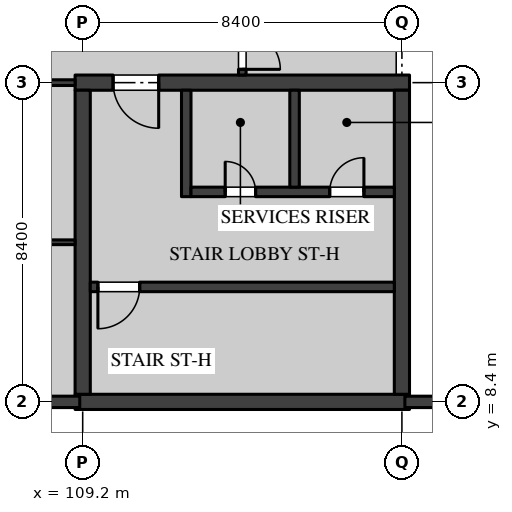
"""IFC4 building model, lengths in metres.
Left out: names, types, materials, properties, quantities, classifications, styles, units other than length and angle.
Written with IfcOpenShell. Run it as: python <this file> out.ifc"""

import sys

from ifc_helpers import new_model, si_unit, direction, frame, frame_2d, origin, place, context, subcontext, project, spatial, polyline, rectangle, outline, extrude, element, fill, save


model = new_model("IFC4")
c1 = context("Model", 3, precision=1e-05, world=origin(), true_north=direction((0.0, 1.0)))
c2 = subcontext(c1, "Body", "Model", "MODEL_VIEW")
j1 = project(units=[si_unit("LENGTHUNIT", "METRE"), si_unit("PLANEANGLEUNIT", "RADIAN")], contexts=[c1])
p1 = place(None, origin())
s1 = spatial("IfcSite", under=j1, at=p1, CompositionType="ELEMENT")
p2 = place(p1, origin())
s2 = spatial("IfcBuilding", under=s1, at=p2, CompositionType="ELEMENT")
p3 = place(p2, frame((0.0, 0.0, 5.4)))
s3 = spatial("IfcBuildingStorey", under=s2, at=p3, CompositionType="ELEMENT", Elevation=5.4)
p4 = place(p3, frame((109.0, 8.4, 0.0), z_axis=(0.0, 0.0, 1.0), x_axis=(1.0, 0.0, 0.0)))
e1 = element("IfcWall", 1, at=p4, inside=s3, PredefinedType="SHEAR", context=c2, shape_type="SweptSolid", body=[
    extrude(rectangle(XDim=8.8, YDim=0.4, at=frame_2d((4.4, 0.0))), origin(), (0.0, 0.0, 1.0), 3.0),
])
p5 = place(p3, frame((109.0, 16.8, 0.0), z_axis=(0.0, 0.0, 1.0), x_axis=(1.0, 0.0, 0.0)))
e2 = element("IfcWall", 2, at=p5, inside=s3, PredefinedType="SHEAR", context=c2, shape_type="SweptSolid", body=[
    extrude(rectangle(XDim=8.8, YDim=0.4, at=frame_2d((4.4, 0.0))), origin(), (0.0, 0.0, 1.0), 3.0),
])
p6 = place(p5, frame((1.0, 0.0, 0.0)))
e3 = element("IfcOpeningElement", 3, at=p6, cuts=e2, PredefinedType="OPENING", context=c2, shape_type="SweptSolid", body=[
    extrude(rectangle(XDim=1.2, YDim=2.1, at=frame_2d((0.6, 1.05))), frame((0.0, 0.21, 0.0), z_axis=(0.0, -1.0, 0.0), x_axis=(1.0, 0.0, 0.0)), (0.0, 0.0, 1.0), 0.42),
])
for number, where, z_axis, x_axis in (
    (4, (109.2, 8.6, 0.0), (0.0, 0.0, 1.0), (0.0, 1.0, 0.0)),
    (5, (117.6, 8.6, 0.0), (0.0, 0.0, 1.0), (0.0, 1.0, 0.0)),
):
    element("IfcWall", number, at=place(p3, frame(where, z_axis=z_axis, x_axis=x_axis)), inside=s3, PredefinedType="SHEAR", context=c2, shape_type="SweptSolid", body=[
        extrude(rectangle(XDim=8.0, YDim=0.4, at=frame_2d((4.0, 0.0))), origin(), (0.0, 0.0, 1.0), 3.0),
    ])
p7 = place(p3, frame((109.4, 11.425, 0.0), z_axis=(0.0, 0.0, 1.0), x_axis=(1.0, 0.0, 0.0)))
e6 = element("IfcWall", 6, at=p7, inside=s3, PredefinedType="SOLIDWALL", context=c2, shape_type="SweptSolid", body=[
    extrude(rectangle(XDim=8.0, YDim=0.25, at=frame_2d((4.0, 0.0))), origin(), (0.0, 0.0, 1.0), 3.0),
])
p8 = place(p7, frame((0.2, 0.0, 0.0)))
e7 = element("IfcOpeningElement", 7, at=p8, cuts=e6, PredefinedType="OPENING", context=c2, shape_type="SweptSolid", body=[
    extrude(rectangle(XDim=1.1, YDim=2.1, at=frame_2d((0.55, 1.05))), frame((0.0, 0.135, 0.0), z_axis=(0.0, -1.0, 0.0), x_axis=(1.0, 0.0, 0.0)), (0.0, 0.0, 1.0), 0.27),
])
p9 = place(p3, frame((111.925, 13.8, 0.0), z_axis=(0.0, 0.0, 1.0), x_axis=(0.0, 1.0, 0.0)))
e8 = element("IfcWall", 8, at=p9, inside=s3, PredefinedType="SOLIDWALL", context=c2, shape_type="SweptSolid", body=[
    extrude(rectangle(XDim=2.8, YDim=0.25, at=frame_2d((1.4, 0.0))), origin(), (0.0, 0.0, 1.0), 3.0),
])
p10 = place(p3, frame((112.05, 13.925, 0.0), z_axis=(0.0, 0.0, 1.0), x_axis=(1.0, 0.0, 0.0)))
e9 = element("IfcWall", 9, at=p10, inside=s3, PredefinedType="SOLIDWALL", context=c2, shape_type="SweptSolid", body=[
    extrude(rectangle(XDim=5.35, YDim=0.25, at=frame_2d((2.675, 0.0))), origin(), (0.0, 0.0, 1.0), 3.0),
])
p11 = place(p10, frame((3.65, 0.0, 0.0)))
e10 = element("IfcOpeningElement", 10, at=p11, cuts=e9, PredefinedType="OPENING", context=c2, shape_type="SweptSolid", body=[
    extrude(rectangle(XDim=0.9, YDim=2.1, at=frame_2d((0.45, 1.05))), frame((0.0, 0.135, 0.0), z_axis=(0.0, -1.0, 0.0), x_axis=(1.0, 0.0, 0.0)), (0.0, 0.0, 1.0), 0.27),
])
p12 = place(p10, frame((0.9, 0.0, 0.0)))
e11 = element("IfcOpeningElement", 11, at=p12, cuts=e9, PredefinedType="OPENING", context=c2, shape_type="SweptSolid", body=[
    extrude(rectangle(XDim=0.8, YDim=2.1, at=frame_2d((0.4, 1.05))), frame((0.0, 0.135, 0.0), z_axis=(0.0, -1.0, 0.0), x_axis=(1.0, 0.0, 0.0)), (0.0, 0.0, 1.0), 0.27),
])
p13 = place(p3, frame((114.775, 14.05, 0.0), z_axis=(0.0, 0.0, 1.0), x_axis=(0.0, 1.0, 0.0)))
e12 = element("IfcWall", 12, at=p13, inside=s3, PredefinedType="SOLIDWALL", context=c2, shape_type="SweptSolid", body=[
    extrude(rectangle(XDim=2.55, YDim=0.25, at=frame_2d((1.275, 0.0))), origin(), (0.0, 0.0, 1.0), 3.0),
])
p14 = place(p2, origin())
s4 = spatial("IfcBuildingStorey", under=s2, at=p14, CompositionType="ELEMENT", Elevation=0.0)
p15 = place(p14, frame((117.6, 17.0, 0.0), z_axis=(0.0, 0.0, 1.0), x_axis=(0.0, 1.0, 0.0)))
e13 = element("IfcWall", 13, at=p15, inside=s4, PredefinedType="PARTITIONING", context=c2, shape_type="SweptSolid", body=[
    extrude(rectangle(XDim=1.9, YDim=0.15, at=frame_2d((0.95, 0.0))), origin(), (0.0, 0.0, 1.0), 8.375),
])
p16 = place(p15, frame((0.45, 0.0, 0.0)))
e14 = element("IfcOpeningElement", 14, at=p16, cuts=e13, PredefinedType="OPENING", context=c2, shape_type="SweptSolid", body=[
    extrude(rectangle(XDim=1.0, YDim=2.1, at=frame_2d((0.5, 1.05))), frame((0.0, 0.085, 0.0), z_axis=(0.0, -1.0, 0.0), x_axis=(1.0, 0.0, 0.0)), (0.0, 0.0, 1.0), 0.17),
])
p17 = place(p3, frame((113.4, 17.0, 0.0), z_axis=(0.0, 0.0, 1.0), x_axis=(0.0, 1.0, 0.0)))
e15 = element("IfcWall", 15, at=p17, inside=s3, PredefinedType="PARTITIONING", context=c2, shape_type="SweptSolid", body=[
    extrude(rectangle(XDim=1.9, YDim=0.2, at=frame_2d((0.95, 0.0))), origin(), (0.0, 0.0, 1.0), 4.37),
])
p18 = place(p17, frame((0.15, 0.0, 0.0)))
e16 = element("IfcOpeningElement", 16, at=p18, cuts=e15, PredefinedType="OPENING", context=c2, shape_type="SweptSolid", body=[
    extrude(rectangle(XDim=1.0, YDim=2.4, at=frame_2d((0.5, 1.2))), frame((0.0, 0.11, 0.0), z_axis=(0.0, -1.0, 0.0), x_axis=(1.0, 0.0, 0.0)), (0.0, 0.0, 1.0), 0.22),
])
p19 = place(p3, frame((101.1, 16.8, 0.0), z_axis=(0.0, 0.0, 1.0), x_axis=(1.0, 0.0, 0.0)))
e17 = element("IfcWall", 17, at=p19, inside=s3, PredefinedType="PARTITIONING", context=c2, shape_type="SweptSolid", body=[
    extrude(rectangle(XDim=7.9, YDim=0.15, at=frame_2d((3.95, 0.0))), origin(), (0.0, 0.0, 1.0), 4.37),
])
p20 = place(p19, frame((3.45, 0.0, 0.0)))
e18 = element("IfcOpeningElement", 18, at=p20, cuts=e17, PredefinedType="OPENING", context=c2, shape_type="SweptSolid", body=[
    extrude(rectangle(XDim=0.9, YDim=2.1, at=frame_2d((0.45, 1.05))), frame((0.0, 0.085, 0.0), z_axis=(0.0, -1.0, 0.0), x_axis=(1.0, 0.0, 0.0)), (0.0, 0.0, 1.0), 0.17),
])
p21 = place(p3, frame((105.0, 12.6, 0.0), z_axis=(0.0, 0.0, 1.0), x_axis=(1.0, 0.0, 0.0)))
e19 = element("IfcWall", 19, at=p21, inside=s3, PredefinedType="PARTITIONING", context=c2, shape_type="SweptSolid", body=[
    extrude(rectangle(XDim=4.0, YDim=0.125, at=frame_2d((2.0, 0.0))), origin(), (0.0, 0.0, 1.0), 4.37),
])
p22 = place(p21, frame((1.9, 0.0, 0.0)))
e20 = element("IfcOpeningElement", 20, at=p22, cuts=e19, PredefinedType="OPENING", context=c2, shape_type="SweptSolid", body=[
    extrude(rectangle(XDim=0.9, YDim=2.1, at=frame_2d((0.45, 1.05))), frame((0.0, 0.073, 0.0), z_axis=(0.0, -1.0, 0.0), x_axis=(1.0, 0.0, 0.0)), (0.0, 0.0, 1.0), 0.145),
])
p23 = place(p3, frame((117.678, 8.4, 0.0), z_axis=(0.0, 0.0, 1.0), x_axis=(1.0, 0.0, 0.0)))
e21 = element("IfcWall", 21, at=p23, inside=s3, PredefinedType="SOLIDWALL", context=c2, shape_type="SweptSolid", body=[
    extrude(outline(polyline([(0.0, 0.0), (8.022, 0.0), (8.022, 4.0), (0.122, 4.0), (0.0, 4.0), (0.0, 0.0)])), frame((0.0, 0.15, 0.0), z_axis=(0.0, -1.0, 0.0), x_axis=(1.0, 0.0, 0.0)), (0.0, 0.0, 1.0), 0.3),
])
p24 = place(p3, frame((101.1, 8.4, 0.0), z_axis=(0.0, 0.0, 1.0), x_axis=(1.0, 0.0, 0.0)))
e22 = element("IfcWall", 22, at=p24, inside=s3, PredefinedType="SOLIDWALL", context=c2, shape_type="SweptSolid", body=[
    extrude(outline(polyline([(0.0, 0.0), (8.022, 0.0), (8.022, 4.0), (7.9, 4.0), (0.0, 4.0), (0.0, 0.0)])), frame((0.0, 0.15, 0.0), z_axis=(0.0, -1.0, 0.0), x_axis=(1.0, 0.0, 0.0)), (0.0, 0.0, 1.0), 0.3),
])
p25 = place(p24, frame((1.35, 0.0, 1.5)))
e23 = element("IfcOpeningElement", 23, at=p25, cuts=e22, PredefinedType="OPENING", context=c2, shape_type="SweptSolid", body=[
    extrude(rectangle(XDim=0.9, YDim=1.2, at=frame_2d((0.45, 0.6))), frame((0.0, 0.16, 0.0), z_axis=(0.0, -1.0, 0.0), x_axis=(1.0, 0.0, 0.0)), (0.0, 0.0, 1.0), 0.32),
])
p26 = place(p11, origin())
e24 = element("IfcDoor", 24, at=p26, inside=s3, OperationType="SINGLE_SWING_LEFT", PredefinedType="DOOR", context=c2, shape_type="SweptSolid", body=[
    extrude(rectangle(XDim=0.9, YDim=2.1, at=frame_2d((0.45, 1.05))), frame((0.0, 0.035, 0.0), z_axis=(0.0, -1.0, 0.0), x_axis=(1.0, 0.0, 0.0)), (0.0, 0.0, 1.0), 0.07),
])
fill(e10, e24)
p27 = place(p6, frame((1.2, 0.0, 0.0), z_axis=(0.0, 0.0, 1.0), x_axis=(-1.0, 0.0, 0.0)))
e25 = element("IfcDoor", 25, at=p27, inside=s3, OperationType="SINGLE_SWING_RIGHT", PredefinedType="DOOR", context=c2, shape_type="SweptSolid", body=[
    extrude(rectangle(XDim=1.2, YDim=2.1, at=frame_2d((0.6, 1.05))), frame((0.0, 0.035, 0.0), z_axis=(0.0, -1.0, 0.0), x_axis=(1.0, 0.0, 0.0)), (0.0, 0.0, 1.0), 0.07),
])
fill(e3, e25)
p28 = place(p12, origin())
e26 = element("IfcDoor", 26, at=p28, inside=s3, OperationType="SINGLE_SWING_RIGHT", PredefinedType="DOOR", context=c2, shape_type="SweptSolid", body=[
    extrude(rectangle(XDim=0.8, YDim=2.1, at=frame_2d((0.4, 1.05))), frame((0.0, 0.035, 0.0), z_axis=(0.0, -1.0, 0.0), x_axis=(1.0, 0.0, 0.0)), (0.0, 0.0, 1.0), 0.07),
])
fill(e11, e26)
p29 = place(p8, frame((1.1, 0.0, 0.0), z_axis=(0.0, 0.0, 1.0), x_axis=(-1.0, 0.0, 0.0)))
e27 = element("IfcDoor", 27, at=p29, inside=s3, OperationType="SINGLE_SWING_LEFT", PredefinedType="DOOR", context=c2, shape_type="SweptSolid", body=[
    extrude(rectangle(XDim=1.1, YDim=2.1, at=frame_2d((0.55, 1.05))), frame((0.0, 0.035, 0.0), z_axis=(0.0, -1.0, 0.0), x_axis=(1.0, 0.0, 0.0)), (0.0, 0.0, 1.0), 0.07),
])
fill(e7, e27)
p30 = place(p18, frame((1.0, 0.0, 0.0), z_axis=(0.0, 0.0, 1.0), x_axis=(-1.0, 0.0, 0.0)))
e28 = element("IfcDoor", 28, at=p30, inside=s3, OperationType="SINGLE_SWING_LEFT", PredefinedType="DOOR", context=c2, shape_type="SweptSolid", body=[
    extrude(rectangle(XDim=1.0, YDim=2.4, at=frame_2d((0.5, 1.2))), frame((0.0, 0.03, 0.0), z_axis=(0.0, -1.0, 0.0), x_axis=(1.0, 0.0, 0.0)), (0.0, 0.0, 1.0), 0.06),
])
fill(e16, e28)
save(model, sys.argv[1])
